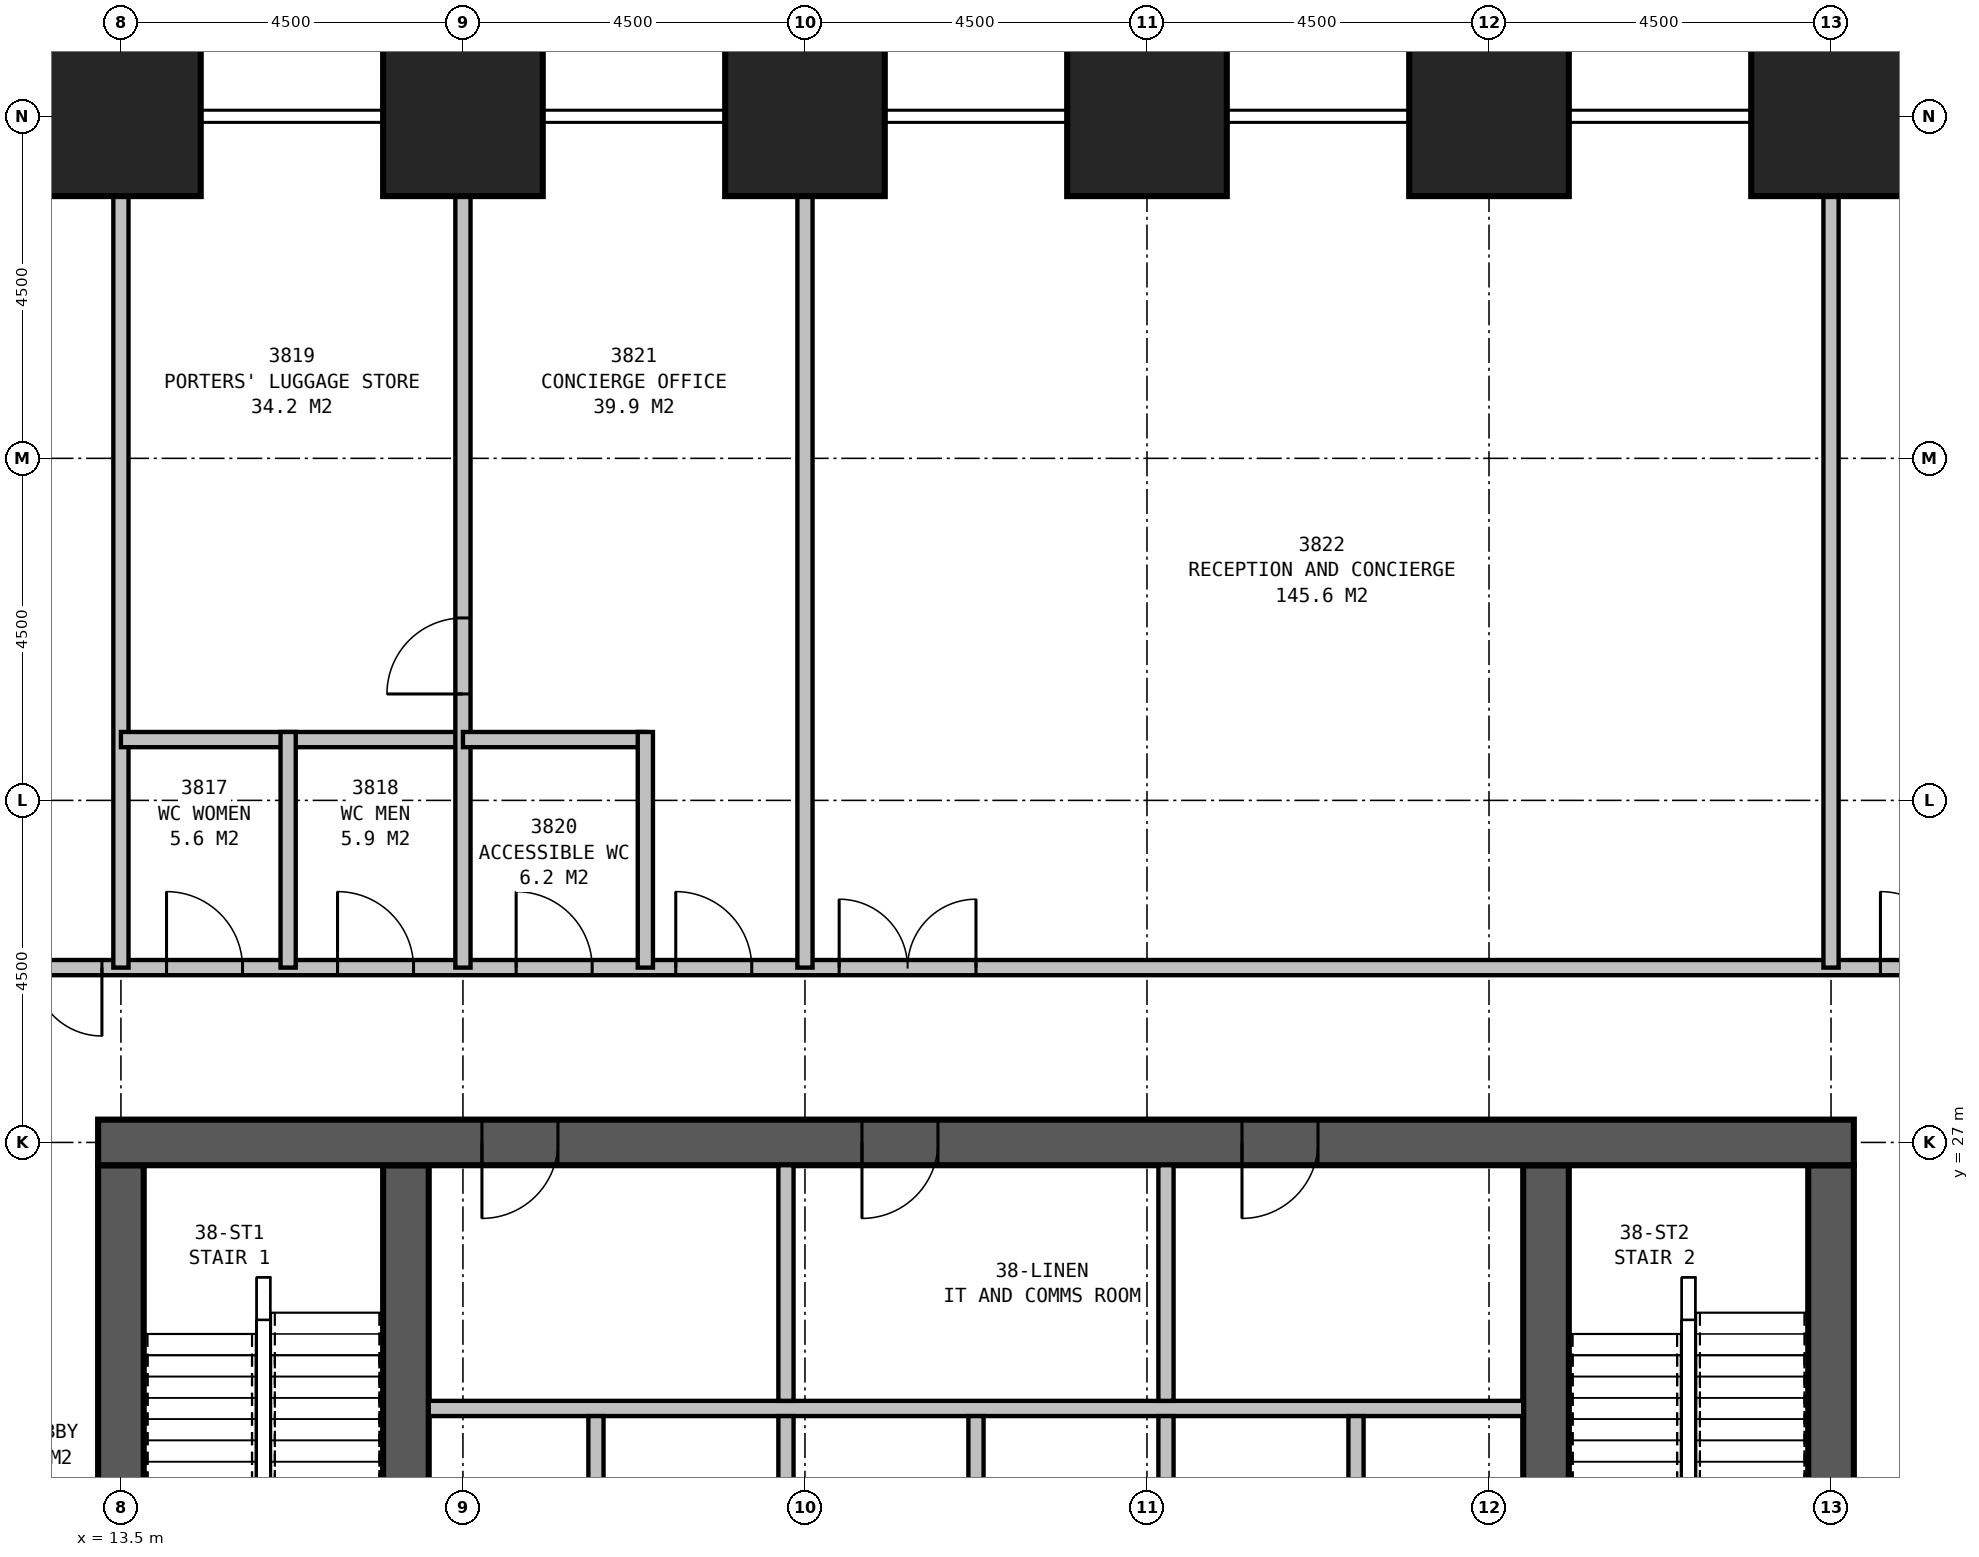
"""IFC4 building model, lengths in metres.
Left out: names, types, materials, properties, quantities, classifications, styles, units other than length and angle.
Written with IfcOpenShell. Run it as: python <this file> out.ifc"""

import sys

from ifc_helpers import new_model, si_unit, direction, frame, frame_2d, origin, origin_2d, place, context, subcontext, project, spatial, rectangle, extrude, element, fill, save


model = new_model("IFC4")
c1 = context("Model", 3, precision=1e-05, world=origin(), true_north=direction((0.0, 1.0)))
c2 = subcontext(c1, "Body", "Model", "MODEL_VIEW")
j1 = project(units=[si_unit("LENGTHUNIT", "METRE"), si_unit("PLANEANGLEUNIT", "RADIAN")], contexts=[c1])
p1 = place(None, origin())
s1 = spatial("IfcSite", under=j1, at=p1, CompositionType="ELEMENT")
p2 = place(p1, origin())
s2 = spatial("IfcBuilding", under=s1, at=p2, CompositionType="ELEMENT")
p3 = place(p2, frame((0.0, 0.0, 145.9)))
s3 = spatial("IfcBuildingStorey", under=s2, at=p3, CompositionType="ELEMENT", Elevation=145.9)
for number, where, z_axis, x_axis in (
    (1, (36.0, 40.5, 0.0), (0.0, 0.0, 1.0), (1.0, 0.0, 0.0)),
    (2, (31.5, 40.5, 0.0), (0.0, 0.0, 1.0), (1.0, 0.0, 0.0)),
    (3, (27.0, 40.5, 0.0), (0.0, 0.0, 1.0), (1.0, 0.0, 0.0)),
    (4, (22.5, 40.5, 0.0), (0.0, 0.0, 1.0), (1.0, 0.0, 0.0)),
    (5, (18.0, 40.5, 0.0), (0.0, 0.0, 1.0), (1.0, 0.0, 0.0)),
    (6, (13.5, 40.5, 0.0), (0.0, 0.0, 1.0), (1.0, 0.0, 0.0)),
):
    element("IfcColumn", number, at=place(p3, frame(where, z_axis=z_axis, x_axis=x_axis)), inside=s3, PredefinedType="COLUMN", context=c2, shape_type="SweptSolid", body=[
        extrude(rectangle(XDim=2.1, YDim=2.1, at=origin_2d()), origin(), (0.0, 0.0, 1.0), 6.0),
    ])
p4 = place(p3, frame((36.3, 27.0, 0.0), z_axis=(0.0, 0.0, 1.0), x_axis=(-1.0, 0.0, 0.0)))
e7 = element("IfcWall", 7, at=p4, inside=s3, PredefinedType="SHEAR", context=c2, shape_type="SweptSolid", body=[
    extrude(rectangle(XDim=23.1, YDim=0.6, at=frame_2d((11.55, 0.0))), origin(), (0.0, 0.0, 1.0), 6.0),
])
p5 = place(p4, frame((17.05, 0.0, 0.0)))
e8 = element("IfcOpeningElement", 8, at=p5, cuts=e7, PredefinedType="OPENING", context=c2, shape_type="SweptSolid", body=[
    extrude(rectangle(XDim=1.0, YDim=2.1, at=frame_2d((0.5, 1.05))), frame((0.0, 0.31, 0.0), z_axis=(0.0, -1.0, 0.0), x_axis=(1.0, 0.0, 0.0)), (0.0, 0.0, 1.0), 0.62),
])
p6 = place(p4, frame((12.05, 0.0, 0.0)))
e9 = element("IfcOpeningElement", 9, at=p6, cuts=e7, PredefinedType="OPENING", context=c2, shape_type="SweptSolid", body=[
    extrude(rectangle(XDim=1.0, YDim=2.1, at=frame_2d((0.5, 1.05))), frame((0.0, 0.31, 0.0), z_axis=(0.0, -1.0, 0.0), x_axis=(1.0, 0.0, 0.0)), (0.0, 0.0, 1.0), 0.62),
])
p7 = place(p4, frame((7.05, 0.0, 0.0)))
e10 = element("IfcOpeningElement", 10, at=p7, cuts=e7, PredefinedType="OPENING", context=c2, shape_type="SweptSolid", body=[
    extrude(rectangle(XDim=1.0, YDim=2.1, at=frame_2d((0.5, 1.05))), frame((0.0, 0.31, 0.0), z_axis=(0.0, -1.0, 0.0), x_axis=(1.0, 0.0, 0.0)), (0.0, 0.0, 1.0), 0.62),
])
p8 = place(p3, frame((17.25, 13.8, 0.0), z_axis=(0.0, 0.0, 1.0), x_axis=(0.0, 1.0, 0.0)))
e11 = element("IfcWall", 11, at=p8, inside=s3, PredefinedType="SHEAR", context=c2, shape_type="SweptSolid", body=[
    extrude(rectangle(XDim=12.9, YDim=0.6, at=frame_2d((6.45, 0.0))), origin(), (0.0, 0.0, 1.0), 6.0),
])
p9 = place(p8, frame((3.85, 0.0, 0.0)))
e12 = element("IfcOpeningElement", 12, at=p9, cuts=e11, PredefinedType="OPENING", context=c2, shape_type="SweptSolid", body=[
    extrude(rectangle(XDim=1.2, YDim=2.1, at=frame_2d((0.6, 1.05))), frame((0.0, 0.31, 0.0), z_axis=(0.0, -1.0, 0.0), x_axis=(1.0, 0.0, 0.0)), (0.0, 0.0, 1.0), 0.62),
])
p10 = place(p3, frame((32.25, 13.8, 0.0), z_axis=(0.0, 0.0, 1.0), x_axis=(0.0, 1.0, 0.0)))
e13 = element("IfcWall", 13, at=p10, inside=s3, PredefinedType="SHEAR", context=c2, shape_type="SweptSolid", body=[
    extrude(rectangle(XDim=12.9, YDim=0.6, at=frame_2d((6.45, 0.0))), origin(), (0.0, 0.0, 1.0), 6.0),
])
p11 = place(p10, frame((5.05, 0.0, 0.0), z_axis=(0.0, 0.0, 1.0), x_axis=(-1.0, 0.0, 0.0)))
e14 = element("IfcOpeningElement", 14, at=p11, cuts=e13, PredefinedType="OPENING", context=c2, shape_type="SweptSolid", body=[
    extrude(rectangle(XDim=1.2, YDim=2.1, at=frame_2d((0.6, 1.05))), frame((0.0, 0.31, 0.0), z_axis=(0.0, -1.0, 0.0), x_axis=(1.0, 0.0, 0.0)), (0.0, 0.0, 1.0), 0.62),
])
for number, where, z_axis, x_axis in (
    (15, (13.5, 26.7, 0.0), (0.0, 0.0, 1.0), (0.0, -1.0, 0.0)),
    (16, (36.0, 20.0, 0.0), (0.0, 0.0, 1.0), (0.0, 1.0, 0.0)),
):
    element("IfcWall", number, at=place(p3, frame(where, z_axis=z_axis, x_axis=x_axis)), inside=s3, PredefinedType="SHEAR", context=c2, shape_type="SweptSolid", body=[
        extrude(rectangle(XDim=6.7, YDim=0.6, at=frame_2d((3.35, 0.0))), origin(), (0.0, 0.0, 1.0), 6.0),
    ])
p12 = place(p3, frame((11.2, 29.3, 0.0), z_axis=(0.0, 0.0, 1.0), x_axis=(1.0, 0.0, 0.0)))
e17 = element("IfcWall", 17, at=p12, inside=s3, PredefinedType="PARTITIONING", context=c2, shape_type="SweptSolid", body=[
    extrude(rectangle(XDim=27.1, YDim=0.2, at=frame_2d((13.55, 0.0))), origin(), (0.0, 0.0, 1.0), 5.7),
])
p13 = place(p12, frame((2.9, 0.0, 0.0)))
e18 = element("IfcOpeningElement", 18, at=p13, cuts=e17, PredefinedType="OPENING", context=c2, shape_type="SweptSolid", body=[
    extrude(rectangle(XDim=1.0, YDim=2.1, at=frame_2d((0.5, 1.05))), frame((0.0, 0.11, 0.0), z_axis=(0.0, -1.0, 0.0), x_axis=(1.0, 0.0, 0.0)), (0.0, 0.0, 1.0), 0.22),
])
p14 = place(p12, frame((5.15, 0.0, 0.0)))
e19 = element("IfcOpeningElement", 19, at=p14, cuts=e17, PredefinedType="OPENING", context=c2, shape_type="SweptSolid", body=[
    extrude(rectangle(XDim=1.0, YDim=2.1, at=frame_2d((0.5, 1.05))), frame((0.0, 0.11, 0.0), z_axis=(0.0, -1.0, 0.0), x_axis=(1.0, 0.0, 0.0)), (0.0, 0.0, 1.0), 0.22),
])
p15 = place(p12, frame((7.5, 0.0, 0.0)))
e20 = element("IfcOpeningElement", 20, at=p15, cuts=e17, PredefinedType="OPENING", context=c2, shape_type="SweptSolid", body=[
    extrude(rectangle(XDim=1.0, YDim=2.1, at=frame_2d((0.5, 1.05))), frame((0.0, 0.11, 0.0), z_axis=(0.0, -1.0, 0.0), x_axis=(1.0, 0.0, 0.0)), (0.0, 0.0, 1.0), 0.22),
])
p16 = place(p12, frame((9.6, 0.0, 0.0)))
e21 = element("IfcOpeningElement", 21, at=p16, cuts=e17, PredefinedType="OPENING", context=c2, shape_type="SweptSolid", body=[
    extrude(rectangle(XDim=1.0, YDim=2.1, at=frame_2d((0.5, 1.05))), frame((0.0, 0.11, 0.0), z_axis=(0.0, -1.0, 0.0), x_axis=(1.0, 0.0, 0.0)), (0.0, 0.0, 1.0), 0.22),
])
p17 = place(p12, frame((11.75, 0.0, 0.0)))
e22 = element("IfcOpeningElement", 22, at=p17, cuts=e17, PredefinedType="OPENING", context=c2, shape_type="SweptSolid", body=[
    extrude(rectangle(XDim=1.8, YDim=2.4, at=frame_2d((0.9, 1.2))), frame((0.0, 0.11, 0.0), z_axis=(0.0, -1.0, 0.0), x_axis=(1.0, 0.0, 0.0)), (0.0, 0.0, 1.0), 0.22),
])
p18 = place(p12, frame((2.05, 0.0, 0.0), z_axis=(0.0, 0.0, 1.0), x_axis=(-1.0, 0.0, 0.0)))
e23 = element("IfcOpeningElement", 23, at=p18, cuts=e17, PredefinedType="OPENING", context=c2, shape_type="SweptSolid", body=[
    extrude(rectangle(XDim=1.8, YDim=2.4, at=frame_2d((0.9, 1.2))), frame((0.0, 0.11, 0.0), z_axis=(0.0, -1.0, 0.0), x_axis=(1.0, 0.0, 0.0)), (0.0, 0.0, 1.0), 0.22),
])
p19 = place(p12, frame((25.45, 0.0, 0.0)))
e24 = element("IfcOpeningElement", 24, at=p19, cuts=e17, PredefinedType="OPENING", context=c2, shape_type="SweptSolid", body=[
    extrude(rectangle(XDim=1.0, YDim=2.1, at=frame_2d((0.5, 1.05))), frame((0.0, 0.11, 0.0), z_axis=(0.0, -1.0, 0.0), x_axis=(1.0, 0.0, 0.0)), (0.0, 0.0, 1.0), 0.22),
])
p20 = place(p3, frame((13.5, 29.3, 0.0), z_axis=(0.0, 0.0, 1.0), x_axis=(0.0, 1.0, 0.0)))
e25 = element("IfcWall", 25, at=p20, inside=s3, PredefinedType="PARTITIONING", context=c2, shape_type="SweptSolid", body=[
    extrude(rectangle(XDim=10.15, YDim=0.2, at=frame_2d((5.075, 0.0))), origin(), (0.0, 0.0, 1.0), 4.7),
])
p21 = place(p3, frame((18.0, 29.3, 0.0), z_axis=(0.0, 0.0, 1.0), x_axis=(0.0, 1.0, 0.0)))
e26 = element("IfcWall", 26, at=p21, inside=s3, PredefinedType="PARTITIONING", context=c2, shape_type="SweptSolid", body=[
    extrude(rectangle(XDim=10.15, YDim=0.2, at=frame_2d((5.075, 0.0))), origin(), (0.0, 0.0, 1.0), 4.7),
])
p22 = place(p21, frame((3.6, 0.0, 0.0)))
e27 = element("IfcOpeningElement", 27, at=p22, cuts=e26, PredefinedType="OPENING", context=c2, shape_type="SweptSolid", body=[
    extrude(rectangle(XDim=1.0, YDim=2.1, at=frame_2d((0.5, 1.05))), frame((0.0, 0.11, 0.0), z_axis=(0.0, -1.0, 0.0), x_axis=(1.0, 0.0, 0.0)), (0.0, 0.0, 1.0), 0.22),
])
for number, where, z_axis, x_axis in (
    (28, (22.5, 29.3, 0.0), (0.0, 0.0, 1.0), (0.0, 1.0, 0.0)),
    (29, (36.0, 29.3, 0.0), (0.0, 0.0, 1.0), (0.0, 1.0, 0.0)),
):
    element("IfcWall", number, at=place(p3, frame(where, z_axis=z_axis, x_axis=x_axis)), inside=s3, PredefinedType="PARTITIONING", context=c2, shape_type="SweptSolid", body=[
        extrude(rectangle(XDim=10.15, YDim=0.2, at=frame_2d((5.075, 0.0))), origin(), (0.0, 0.0, 1.0), 4.7),
    ])
p23 = place(p3, frame((15.7, 29.3, 0.0), z_axis=(0.0, 0.0, 1.0), x_axis=(0.0, 1.0, 0.0)))
e30 = element("IfcWall", 30, at=p23, inside=s3, PredefinedType="PARTITIONING", context=c2, shape_type="SweptSolid", body=[
    extrude(rectangle(XDim=3.1, YDim=0.2, at=frame_2d((1.55, 0.0))), origin(), (0.0, 0.0, 1.0), 5.7),
])
p24 = place(p3, frame((13.5, 32.3, 0.0), z_axis=(0.0, 0.0, 1.0), x_axis=(1.0, 0.0, 0.0)))
e31 = element("IfcWall", 31, at=p24, inside=s3, PredefinedType="PARTITIONING", context=c2, shape_type="SweptSolid", body=[
    extrude(rectangle(XDim=4.5, YDim=0.2, at=frame_2d((2.25, 0.0))), origin(), (0.0, 0.0, 1.0), 5.7),
])
p25 = place(p3, frame((20.4, 29.3, 0.0), z_axis=(0.0, 0.0, 1.0), x_axis=(0.0, 1.0, 0.0)))
e32 = element("IfcWall", 32, at=p25, inside=s3, PredefinedType="PARTITIONING", context=c2, shape_type="SweptSolid", body=[
    extrude(rectangle(XDim=3.1, YDim=0.2, at=frame_2d((1.55, 0.0))), origin(), (0.0, 0.0, 1.0), 5.7),
])
p26 = place(p3, frame((18.0, 32.3, 0.0), z_axis=(0.0, 0.0, 1.0), x_axis=(1.0, 0.0, 0.0)))
e33 = element("IfcWall", 33, at=p26, inside=s3, PredefinedType="PARTITIONING", context=c2, shape_type="SweptSolid", body=[
    extrude(rectangle(XDim=2.4, YDim=0.2, at=frame_2d((1.2, 0.0))), origin(), (0.0, 0.0, 1.0), 5.7),
])
for number, where, z_axis, x_axis in (
    (34, (19.75, 20.3, 0.0), (0.0, 0.0, 1.0), (0.0, 1.0, 0.0)),
    (35, (22.25, 20.3, 0.0), (0.0, 0.0, 1.0), (0.0, 1.0, 0.0)),
    (36, (24.75, 20.3, 0.0), (0.0, 0.0, 1.0), (0.0, 1.0, 0.0)),
    (37, (27.25, 20.3, 0.0), (0.0, 0.0, 1.0), (0.0, 1.0, 0.0)),
    (38, (29.75, 20.3, 0.0), (0.0, 0.0, 1.0), (0.0, 1.0, 0.0)),
):
    element("IfcWall", number, at=place(p3, frame(where, z_axis=z_axis, x_axis=x_axis)), inside=s3, PredefinedType="PARTITIONING", context=c2, shape_type="SweptSolid", body=[
        extrude(rectangle(XDim=3.1, YDim=0.2, at=frame_2d((1.55, 0.0))), origin(), (0.0, 0.0, 1.0), 5.7),
    ])
p27 = place(p3, frame((17.55, 23.5, 0.0), z_axis=(0.0, 0.0, 1.0), x_axis=(1.0, 0.0, 0.0)))
e39 = element("IfcWall", 39, at=p27, inside=s3, PredefinedType="PARTITIONING", context=c2, shape_type="SweptSolid", body=[
    extrude(rectangle(XDim=14.4, YDim=0.2, at=frame_2d((7.2, 0.0))), origin(), (0.0, 0.0, 1.0), 5.7),
])
for number, where, z_axis, x_axis in (
    (40, (22.25, 23.6, 0.0), (0.0, 0.0, 1.0), (0.0, 1.0, 0.0)),
    (41, (27.25, 23.6, 0.0), (0.0, 0.0, 1.0), (0.0, 1.0, 0.0)),
):
    element("IfcWall", number, at=place(p3, frame(where, z_axis=z_axis, x_axis=x_axis)), inside=s3, PredefinedType="PARTITIONING", context=c2, shape_type="SweptSolid", body=[
        extrude(rectangle(XDim=3.1, YDim=0.2, at=frame_2d((1.55, 0.0))), origin(), (0.0, 0.0, 1.0), 5.7),
    ])
p28 = place(p13, origin())
e42 = element("IfcDoor", 42, at=p28, inside=s3, OperationType="SINGLE_SWING_LEFT", PredefinedType="DOOR", context=c2, shape_type="SweptSolid", body=[
    extrude(rectangle(XDim=1.0, YDim=2.1, at=frame_2d((0.5, 1.05))), frame((0.0, 0.025, 0.0), z_axis=(0.0, -1.0, 0.0), x_axis=(1.0, 0.0, 0.0)), (0.0, 0.0, 1.0), 0.05),
])
fill(e18, e42)
p29 = place(p14, origin())
e43 = element("IfcDoor", 43, at=p29, inside=s3, OperationType="SINGLE_SWING_LEFT", PredefinedType="DOOR", context=c2, shape_type="SweptSolid", body=[
    extrude(rectangle(XDim=1.0, YDim=2.1, at=frame_2d((0.5, 1.05))), frame((0.0, 0.025, 0.0), z_axis=(0.0, -1.0, 0.0), x_axis=(1.0, 0.0, 0.0)), (0.0, 0.0, 1.0), 0.05),
])
fill(e19, e43)
p30 = place(p15, origin())
e44 = element("IfcDoor", 44, at=p30, inside=s3, OperationType="SINGLE_SWING_LEFT", PredefinedType="DOOR", context=c2, shape_type="SweptSolid", body=[
    extrude(rectangle(XDim=1.0, YDim=2.1, at=frame_2d((0.5, 1.05))), frame((0.0, 0.025, 0.0), z_axis=(0.0, -1.0, 0.0), x_axis=(1.0, 0.0, 0.0)), (0.0, 0.0, 1.0), 0.05),
])
fill(e20, e44)
p31 = place(p16, origin())
e45 = element("IfcDoor", 45, at=p31, inside=s3, OperationType="SINGLE_SWING_LEFT", PredefinedType="DOOR", context=c2, shape_type="SweptSolid", body=[
    extrude(rectangle(XDim=1.0, YDim=2.1, at=frame_2d((0.5, 1.05))), frame((0.0, 0.025, 0.0), z_axis=(0.0, -1.0, 0.0), x_axis=(1.0, 0.0, 0.0)), (0.0, 0.0, 1.0), 0.05),
])
fill(e21, e45)
p32 = place(p17, origin())
e46 = element("IfcDoor", 46, at=p32, inside=s3, OperationType="DOUBLE_DOOR_SINGLE_SWING", PredefinedType="DOOR", context=c2, shape_type="SweptSolid", body=[
    extrude(rectangle(XDim=1.8, YDim=2.4, at=frame_2d((0.9, 1.2))), frame((0.0, 0.025, 0.0), z_axis=(0.0, -1.0, 0.0), x_axis=(1.0, 0.0, 0.0)), (0.0, 0.0, 1.0), 0.05),
])
fill(e22, e46)
p33 = place(p18, origin())
e47 = element("IfcDoor", 47, at=p33, inside=s3, OperationType="DOUBLE_DOOR_SINGLE_SWING", PredefinedType="DOOR", context=c2, shape_type="SweptSolid", body=[
    extrude(rectangle(XDim=1.8, YDim=2.4, at=frame_2d((0.9, 1.2))), frame((0.0, 0.025, 0.0), z_axis=(0.0, -1.0, 0.0), x_axis=(1.0, 0.0, 0.0)), (0.0, 0.0, 1.0), 0.05),
])
fill(e23, e47)
p34 = place(p19, origin())
e48 = element("IfcDoor", 48, at=p34, inside=s3, OperationType="SINGLE_SWING_LEFT", PredefinedType="DOOR", context=c2, shape_type="SweptSolid", body=[
    extrude(rectangle(XDim=1.0, YDim=2.1, at=frame_2d((0.5, 1.05))), frame((0.0, 0.025, 0.0), z_axis=(0.0, -1.0, 0.0), x_axis=(1.0, 0.0, 0.0)), (0.0, 0.0, 1.0), 0.05),
])
fill(e24, e48)
p35 = place(p22, origin())
e49 = element("IfcDoor", 49, at=p35, inside=s3, OperationType="SINGLE_SWING_LEFT", PredefinedType="DOOR", context=c2, shape_type="SweptSolid", body=[
    extrude(rectangle(XDim=1.0, YDim=2.1, at=frame_2d((0.5, 1.05))), frame((0.0, 0.025, 0.0), z_axis=(0.0, -1.0, 0.0), x_axis=(1.0, 0.0, 0.0)), (0.0, 0.0, 1.0), 0.05),
])
fill(e27, e49)
p36 = place(p5, origin())
e50 = element("IfcDoor", 50, at=p36, inside=s3, OperationType="SINGLE_SWING_RIGHT", PredefinedType="DOOR", context=c2, shape_type="SweptSolid", body=[
    extrude(rectangle(XDim=1.0, YDim=2.1, at=frame_2d((0.5, 1.05))), frame((0.0, 0.3, 0.0), z_axis=(0.0, -1.0, 0.0), x_axis=(1.0, 0.0, 0.0)), (0.0, 0.0, 1.0), 0.6),
])
fill(e8, e50)
p37 = place(p6, origin())
e51 = element("IfcDoor", 51, at=p37, inside=s3, OperationType="SINGLE_SWING_RIGHT", PredefinedType="DOOR", context=c2, shape_type="SweptSolid", body=[
    extrude(rectangle(XDim=1.0, YDim=2.1, at=frame_2d((0.5, 1.05))), frame((0.0, 0.3, 0.0), z_axis=(0.0, -1.0, 0.0), x_axis=(1.0, 0.0, 0.0)), (0.0, 0.0, 1.0), 0.6),
])
fill(e9, e51)
p38 = place(p7, origin())
e52 = element("IfcDoor", 52, at=p38, inside=s3, OperationType="SINGLE_SWING_RIGHT", PredefinedType="DOOR", context=c2, shape_type="SweptSolid", body=[
    extrude(rectangle(XDim=1.0, YDim=2.1, at=frame_2d((0.5, 1.05))), frame((0.0, 0.3, 0.0), z_axis=(0.0, -1.0, 0.0), x_axis=(1.0, 0.0, 0.0)), (0.0, 0.0, 1.0), 0.6),
])
fill(e10, e52)
save(model, sys.argv[1])
